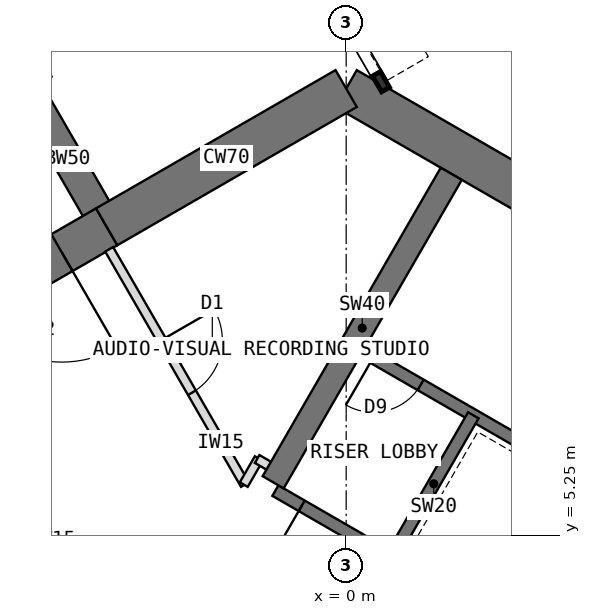
"""IFC4 building model, lengths in metres.
Left out: names, types, materials, properties, quantities, classifications, styles, units other than length and angle.
Written with IfcOpenShell. Run it as: python <this file> out.ifc"""

import sys

from ifc_helpers import new_model, si_unit, direction, frame, frame_2d, origin, place, context, subcontext, project, spatial, rectangle, extrude, element, fill, save


model = new_model("IFC4")
c1 = context("Model", 3, precision=1e-05, world=origin(), true_north=direction((0.0, 1.0)))
c2 = subcontext(c1, "Body", "Model", "MODEL_VIEW")
j1 = project(units=[si_unit("LENGTHUNIT", "METRE"), si_unit("PLANEANGLEUNIT", "RADIAN")], contexts=[c1])
p1 = place(None, origin())
s1 = spatial("IfcSite", under=j1, at=p1, CompositionType="ELEMENT")
p2 = place(p1, origin())
s2 = spatial("IfcBuilding", under=s1, at=p2, CompositionType="ELEMENT")
p3 = place(p2, frame((0.0, 0.0, 48.5)))
s3 = spatial("IfcBuildingStorey", under=s2, at=p3, CompositionType="ELEMENT", Elevation=48.5)
p4 = place(p3, frame((10.908, 6.298, 0.0), z_axis=(0.0, 0.0, 1.0), x_axis=(-0.866021940709, 0.500005998175, 0.0)))
e1 = element("IfcWall", 1, at=p4, inside=s3, PredefinedType="SHEAR", context=c2, shape_type="SweptSolid", body=[
    extrude(rectangle(XDim=12.596, YDim=0.7, at=frame_2d((6.298, 0.0))), origin(), (0.0, 0.0, 1.0), 4.0),
])
p5 = place(p3, frame((0.0, 12.596, 0.0), z_axis=(0.0, 0.0, 1.0), x_axis=(-0.866011268655, -0.500024481964, 0.0)))
e2 = element("IfcWall", 2, at=p5, inside=s3, PredefinedType="SHEAR", context=c2, shape_type="SweptSolid", body=[
    extrude(rectangle(XDim=4.548, YDim=0.7, at=frame_2d((2.274, 0.0))), origin(), (0.0, 0.0, 1.0), 4.0),
])
p6 = place(p3, frame((-3.939, 10.322, 0.0), z_axis=(0.0, 0.0, 1.0), x_axis=(-0.866019471182, -0.500010275428, 0.0)))
e3 = element("IfcWall", 3, at=p6, inside=s3, PredefinedType="SHEAR", context=c2, shape_type="SweptSolid", body=[
    extrude(rectangle(XDim=3.5, YDim=0.7, at=frame_2d((1.75, 0.0))), origin(), (0.0, 0.0, 1.0), 4.0),
])
p7 = place(p6, frame((0.85, 0.0, 0.0)))
e4 = element("IfcOpeningElement", 4, at=p7, cuts=e3, PredefinedType="OPENING", context=c2, shape_type="SweptSolid", body=[
    extrude(rectangle(XDim=1.8, YDim=2.1, at=frame_2d((0.9, 1.05))), frame((0.0, 0.36, 0.0), z_axis=(0.0, -1.0, 0.0), x_axis=(1.0, 0.0, 0.0)), (0.0, 0.0, 1.0), 0.72),
])
p8 = place(p3, frame((-3.939, 10.322, 0.0), z_axis=(0.0, 0.0, 1.0), x_axis=(-0.499918158782, 0.866072649678, 0.0)))
e5 = element("IfcWall", 5, at=p8, inside=s3, PredefinedType="SHEAR", context=c2, shape_type="SweptSolid", body=[
    extrude(rectangle(XDim=2.592, YDim=0.5, at=frame_2d((1.296, 0.0))), origin(), (0.0, 0.0, 1.0), 4.0),
])
p9 = place(p3, frame((5.764, 1.984, 0.0), z_axis=(0.0, 0.0, 1.0), x_axis=(-0.866026010844, 0.49999894854, 0.0)))
e6 = element("IfcWall", 6, at=p9, inside=s3, PredefinedType="SHEAR", context=c2, shape_type="SweptSolid", body=[
    extrude(rectangle(XDim=8.0, YDim=0.2, at=frame_2d((4.0, 0.0))), origin(), (0.0, 0.0, 1.0), 4.0),
])
p10 = place(p9, frame((6.3, 0.0, 0.0)))
e7 = element("IfcOpeningElement", 7, at=p10, cuts=e6, PredefinedType="OPENING", context=c2, shape_type="SweptSolid", body=[
    extrude(rectangle(XDim=1.2, YDim=2.1, at=frame_2d((0.6, 1.05))), frame((0.0, 0.11, 0.0), z_axis=(0.0, -1.0, 0.0), x_axis=(1.0, 0.0, 0.0)), (0.0, 0.0, 1.0), 0.22),
])
p11 = place(p3, frame((0.791, 4.97, 0.0), z_axis=(0.0, 0.0, 1.0), x_axis=(0.499936506574, 0.866062058628, 0.0)))
e8 = element("IfcWall", 8, at=p11, inside=s3, PredefinedType="SHEAR", context=c2, shape_type="SweptSolid", body=[
    extrude(rectangle(XDim=2.6, YDim=0.2, at=frame_2d((1.3, 0.0))), origin(), (0.0, 0.0, 1.0), 4.0),
])
p12 = place(p3, frame((7.114, 4.322, 0.0), z_axis=(0.0, 0.0, 1.0), x_axis=(-0.866026010844, 0.49999894854, 0.0)))
e9 = element("IfcWall", 9, at=p12, inside=s3, PredefinedType="SHEAR", context=c2, shape_type="SweptSolid", body=[
    extrude(rectangle(XDim=8.0, YDim=0.2, at=frame_2d((4.0, 0.0))), origin(), (0.0, 0.0, 1.0), 4.0),
])
p13 = place(p12, frame((6.8, 0.0, 0.0)))
e10 = element("IfcOpeningElement", 10, at=p13, cuts=e9, PredefinedType="OPENING", context=c2, shape_type="SweptSolid", body=[
    extrude(rectangle(XDim=0.9, YDim=2.1, at=frame_2d((0.45, 1.05))), frame((0.0, 0.11, 0.0), z_axis=(0.0, -1.0, 0.0), x_axis=(1.0, 0.0, 0.0)), (0.0, 0.0, 1.0), 0.22),
])
p14 = place(p3, frame((-1.201, 6.12, 0.0), z_axis=(0.0, 0.0, 1.0), x_axis=(0.500002627198, 0.866023886965, 0.0)))
e11 = element("IfcWall", 11, at=p14, inside=s3, PredefinedType="SHEAR", context=c2, shape_type="SweptSolid", body=[
    extrude(rectangle(XDim=5.858, YDim=0.4, at=frame_2d((2.929, 0.0))), origin(), (0.0, 0.0, 1.0), 4.0),
])
p15 = place(p3, frame((-4.436, 4.483, 0.0), z_axis=(0.0, 0.0, 1.0), x_axis=(-0.500017246033, 0.866015446554, 0.0)))
e12 = element("IfcWall", 12, at=p15, inside=s3, PredefinedType="PARTITIONING", context=c2, shape_type="SweptSolid", body=[
    extrude(rectangle(XDim=4.469, YDim=0.15, at=frame_2d((2.234, 0.0))), origin(), (0.0, 0.0, 1.0), 3.8),
])
p16 = place(p15, frame((1.744, 0.0, 0.0)))
e13 = element("IfcOpeningElement", 13, at=p16, cuts=e12, PredefinedType="OPENING", context=c2, shape_type="SweptSolid", body=[
    extrude(rectangle(XDim=1.0, YDim=2.1, at=frame_2d((0.5, 1.05))), frame((0.0, 0.085, 0.0), z_axis=(0.0, -1.0, 0.0), x_axis=(1.0, 0.0, 0.0)), (0.0, 0.0, 1.0), 0.17),
])
p17 = place(p3, frame((-3.898, 9.952, 0.0), z_axis=(0.0, 0.0, 1.0), x_axis=(0.499999927604, -0.866025445582, 0.0)))
e14 = element("IfcWall", 14, at=p17, inside=s3, PredefinedType="PARTITIONING", context=c2, shape_type="SweptSolid", body=[
    extrude(rectangle(XDim=4.468, YDim=0.15, at=frame_2d((2.234, 0.0))), origin(), (0.0, 0.0, 1.0), 3.8),
])
p18 = place(p17, frame((1.724, 0.0, 0.0)))
e15 = element("IfcOpeningElement", 15, at=p18, cuts=e14, PredefinedType="OPENING", context=c2, shape_type="SweptSolid", body=[
    extrude(rectangle(XDim=1.0, YDim=2.1, at=frame_2d((0.5, 1.05))), frame((0.0, 0.085, 0.0), z_axis=(0.0, -1.0, 0.0), x_axis=(1.0, 0.0, 0.0)), (0.0, 0.0, 1.0), 0.17),
])
p19 = place(p3, frame((-1.684, 6.083, 0.0), z_axis=(0.0, 0.0, 1.0), x_axis=(0.50033519877, 0.865831790172, 0.0)))
e16 = element("IfcWall", 16, at=p19, inside=s3, PredefinedType="PARTITIONING", context=c2, shape_type="SweptSolid", body=[
    extrude(rectangle(XDim=0.494, YDim=0.15, at=frame_2d((0.247, 0.0))), origin(), (0.0, 0.0, 1.0), 3.8),
])
p20 = place(p3, frame((-1.464, 6.503, 0.0), z_axis=(0.0, 0.0, 1.0), x_axis=(0.866138304741, -0.499804398801, 0.0)))
e17 = element("IfcWall", 17, at=p20, inside=s3, PredefinedType="PARTITIONING", context=c2, shape_type="SweptSolid", body=[
    extrude(rectangle(XDim=0.43, YDim=0.15, at=frame_2d((0.215, 0.0))), origin(), (0.0, 0.0, 1.0), 3.8),
])
p21 = place(p10, origin())
e18 = element("IfcDoor", 18, at=p21, inside=s3, OperationType="SINGLE_SWING_RIGHT", PredefinedType="DOOR", context=c2, shape_type="SweptSolid", body=[
    extrude(rectangle(XDim=1.2, YDim=2.1, at=frame_2d((0.6, 1.05))), frame((0.0, 0.025, 0.0), z_axis=(0.0, -1.0, 0.0), x_axis=(1.0, 0.0, 0.0)), (0.0, 0.0, 1.0), 0.05),
])
fill(e7, e18)
p22 = place(p13, origin())
e19 = element("IfcDoor", 19, at=p22, inside=s3, OperationType="SINGLE_SWING_RIGHT", PredefinedType="DOOR", context=c2, shape_type="SweptSolid", body=[
    extrude(rectangle(XDim=0.9, YDim=2.1, at=frame_2d((0.45, 1.05))), frame((0.0, 0.025, 0.0), z_axis=(0.0, -1.0, 0.0), x_axis=(1.0, 0.0, 0.0)), (0.0, 0.0, 1.0), 0.05),
])
fill(e10, e19)
p23 = place(p7, origin())
e20 = element("IfcDoor", 20, at=p23, inside=s3, OperationType="DOUBLE_DOOR_DOUBLE_SWING", PredefinedType="DOOR", context=c2, shape_type="SweptSolid", body=[
    extrude(rectangle(XDim=1.72, YDim=2.06, at=frame_2d((0.9, 1.03))), frame((0.0, 0.025, 0.0), z_axis=(0.0, -1.0, 0.0), x_axis=(1.0, 0.0, 0.0)), (0.0, 0.0, 1.0), 0.05),
    extrude(rectangle(XDim=0.04, YDim=2.1, at=frame_2d((0.02, 1.05))), frame((0.0, 0.35, 0.0), z_axis=(0.0, -1.0, 0.0), x_axis=(1.0, 0.0, 0.0)), (0.0, 0.0, 1.0), 0.699),
    extrude(rectangle(XDim=0.04, YDim=2.1, at=frame_2d((1.78, 1.05))), frame((0.0, 0.35, 0.0), z_axis=(0.0, -1.0, 0.0), x_axis=(1.0, 0.0, 0.0)), (0.0, 0.0, 1.0), 0.699),
    extrude(rectangle(XDim=1.72, YDim=0.04, at=frame_2d((0.9, 2.08))), frame((0.0, 0.35, 0.0), z_axis=(0.0, -1.0, 0.0), x_axis=(1.0, 0.0, 0.0)), (0.0, 0.0, 1.0), 0.699),
])
fill(e4, e20)
p24 = place(p18, origin())
e21 = element("IfcDoor", 21, at=p24, inside=s3, OperationType="SINGLE_SWING_LEFT", PredefinedType="DOOR", context=c2, shape_type="SweptSolid", body=[
    extrude(rectangle(XDim=1.0, YDim=2.1, at=frame_2d((0.5, 1.05))), frame((0.0, 0.025, 0.0), z_axis=(0.0, -1.0, 0.0), x_axis=(1.0, 0.0, 0.0)), (0.0, 0.0, 1.0), 0.05),
])
fill(e15, e21)
save(model, sys.argv[1])
